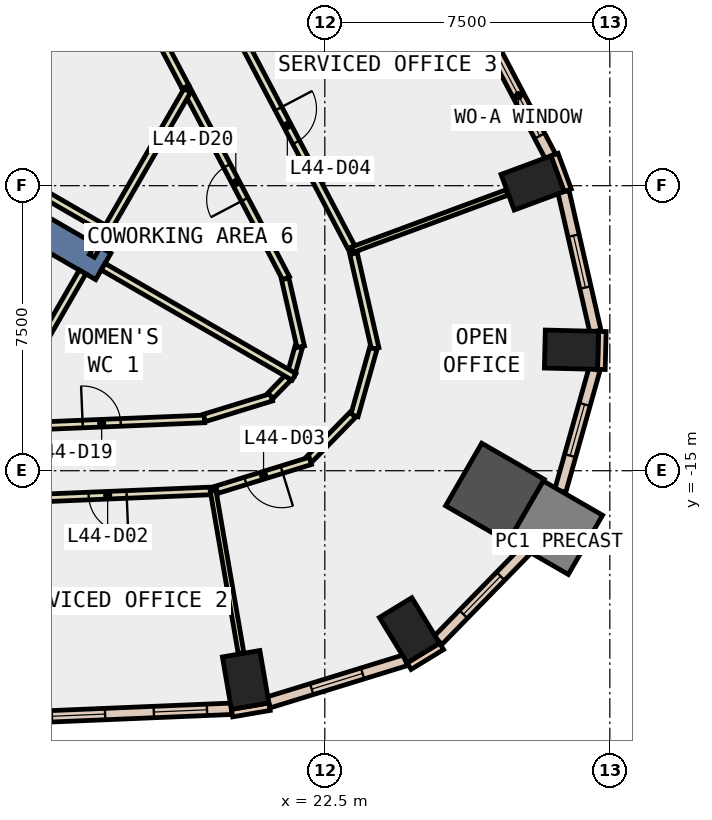
"""IFC4 building model, lengths in metres.
Left out: names, types, materials, properties, quantities, classifications, styles, units other than length and angle.
Written with IfcOpenShell. Run it as: python <this file> out.ifc"""

import sys

from ifc_helpers import new_model, si_unit, direction, frame, frame_2d, origin, origin_2d, place, context, subcontext, project, spatial, rectangle, extrude, element, fill, save


model = new_model("IFC4")
c1 = context("Model", 3, precision=1e-05, world=origin(), true_north=direction((0.0, 1.0)))
c2 = subcontext(c1, "Body", "Model", "MODEL_VIEW")
j1 = project(units=[si_unit("LENGTHUNIT", "METRE"), si_unit("PLANEANGLEUNIT", "RADIAN")], contexts=[c1])
p1 = place(None, origin())
s1 = spatial("IfcSite", under=j1, at=p1, CompositionType="ELEMENT")
p2 = place(p1, origin())
s2 = spatial("IfcBuilding", under=s1, at=p2, CompositionType="ELEMENT")
p3 = place(p2, frame((0.0, 0.0, 198.2)))
s3 = spatial("IfcBuildingStorey", under=s2, at=p3, CompositionType="ELEMENT", Elevation=198.2)
for number, where, z_axis, x_axis in (
    (1, (20.417, -20.505, -0.4), (0.0, 0.0, 1.0), (0.986, 0.169, 0.0)),
    (2, (24.728, -19.199, -0.4), (0.0, 0.0, 1.0), (0.853, 0.521, 0.0)),
):
    element("IfcColumn", number, at=place(p3, frame(where, z_axis=z_axis, x_axis=x_axis)), inside=s3, PredefinedType="COLUMN", context=c2, shape_type="SweptSolid", body=[
        extrude(rectangle(XDim=1.0, YDim=1.4, at=origin_2d()), origin(), (0.0, 0.0, 1.0), 4.2),
    ])
p4 = place(p3, frame((26.977, -15.575, -0.4), z_axis=(0.0, 0.0, 1.0), x_axis=(-0.866025403784, 0.5, 0.0)))
e3 = element("IfcColumn", 3, at=p4, inside=s3, PredefinedType="COLUMN", context=c2, shape_type="SweptSolid", body=[
    extrude(rectangle(XDim=1.9, YDim=1.9, at=origin_2d()), origin(), (0.0, 0.0, 1.0), 4.2),
])
for number, where, z_axis, x_axis in (
    (4, (28.99, -11.816, -0.4), (0.0, 0.0, 1.0), (0.025, 1.0, 0.0)),
    (5, (27.967, -7.429, -0.4), (0.0, 0.0, 1.0), (-0.347, 0.938, 0.0)),
):
    element("IfcColumn", number, at=place(p3, frame(where, z_axis=z_axis, x_axis=x_axis)), inside=s3, PredefinedType="COLUMN", context=c2, shape_type="SweptSolid", body=[
        extrude(rectangle(XDim=1.0, YDim=1.4, at=origin_2d()), origin(), (0.0, 0.0, 1.0), 4.2),
    ])
p5 = place(p3, frame((28.579, -16.5, -0.4), z_axis=(0.0, 0.0, 1.0), x_axis=(-0.866025403784, 0.5, 0.0)))
e6 = element("IfcColumn", 6, at=p5, inside=s3, PredefinedType="COLUMN", context=c2, shape_type="SweptSolid", body=[
    extrude(rectangle(XDim=1.8, YDim=1.8, at=origin_2d()), origin(), (0.0, 0.0, 1.0), 4.2),
])
p6 = place(p3, frame((8.877, -5.125, -0.4), z_axis=(0.0, 0.0, 1.0), x_axis=(0.866017533419, -0.500013631625, 0.0)))
e7 = element("IfcWall", 7, at=p6, inside=s3, PredefinedType="SHEAR", context=c2, shape_type="SweptSolid", body=[
    extrude(rectangle(XDim=9.0, YDim=0.8, at=frame_2d((4.5, 0.0))), origin(), (0.0, 0.0, 1.0), 4.2),
])
for number, where, z_axis, x_axis in (
    (8, (28.891, -7.621, 0.0), (0.0, 0.0, 1.0), (-0.347, 0.938, 0.0)),
    (9, (20.059, -21.378, 0.0), (0.0, 0.0, 1.0), (0.986, 0.169, 0.0)),
):
    element("IfcWall", number, at=place(p3, frame(where, z_axis=z_axis, x_axis=x_axis)), inside=s3, PredefinedType="STANDARD", context=c2, shape_type="SweptSolid", body=[
        extrude(rectangle(XDim=1.0, YDim=0.2, at=frame_2d((0.5, 0.0))), origin(), (0.0, 0.0, 1.0), 3.8),
    ])
p7 = place(p3, frame((24.718, -20.142, 0.0), z_axis=(0.0, 0.0, 1.0), x_axis=(0.853679739553, 0.520798331677, 0.0)))
e10 = element("IfcWall", 10, at=p7, inside=s3, PredefinedType="STANDARD", context=c2, shape_type="SweptSolid", body=[
    extrude(rectangle(XDim=1.0, YDim=0.2, at=frame_2d((0.5, 0.0))), origin(), (0.0, 0.0, 1.0), 3.8),
])
p8 = place(p3, frame((29.778, -12.335, 0.0), z_axis=(0.0, 0.0, 1.0), x_axis=(0.023942303888, 0.999713341956, 0.0)))
e11 = element("IfcWall", 11, at=p8, inside=s3, PredefinedType="STANDARD", context=c2, shape_type="SweptSolid", body=[
    extrude(rectangle(XDim=0.999, YDim=0.2, at=frame_2d((0.5, 0.0))), origin(), (0.0, 0.0, 1.0), 3.8),
])
p9 = place(p3, frame((14.678, -21.488, 0.0), z_axis=(0.0, 0.0, 1.0), x_axis=(0.999127941775, 0.041753514387, 0.0)))
e12 = element("IfcWall", 12, at=p9, inside=s3, PredefinedType="STANDARD", context=c2, shape_type="SweptSolid", body=[
    extrude(rectangle(XDim=5.368, YDim=0.3, at=frame_2d((2.684, 0.0))), origin(), (0.0, 0.0, 1.0), 3.8),
])
p10 = place(p9, frame((0.642, 0.0, 0.9)))
e13 = element("IfcOpeningElement", 13, at=p10, cuts=e12, PredefinedType="OPENING", context=c2, shape_type="SweptSolid", body=[
    extrude(rectangle(XDim=1.4, YDim=2.6, at=frame_2d((0.7, 1.3))), frame((0.0, 0.16, 0.0), z_axis=(0.0, -1.0, 0.0), x_axis=(1.0, 0.0, 0.0)), (0.0, 0.0, 1.0), 0.32),
])
p11 = place(p9, frame((3.326, 0.0, 0.9)))
e14 = element("IfcOpeningElement", 14, at=p11, cuts=e12, PredefinedType="OPENING", context=c2, shape_type="SweptSolid", body=[
    extrude(rectangle(XDim=1.4, YDim=2.6, at=frame_2d((0.7, 1.3))), frame((0.0, 0.16, 0.0), z_axis=(0.0, -1.0, 0.0), x_axis=(1.0, 0.0, 0.0)), (0.0, 0.0, 1.0), 0.32),
])
p12 = place(p3, frame((21.024, -21.095, 0.0), z_axis=(0.0, 0.0, 1.0), x_axis=(0.955692086233, 0.29436819854, 0.0)))
e15 = element("IfcWall", 15, at=p12, inside=s3, PredefinedType="STANDARD", context=c2, shape_type="SweptSolid", body=[
    extrude(rectangle(XDim=3.767, YDim=0.3, at=frame_2d((1.884, 0.0))), origin(), (0.0, 0.0, 1.0), 3.8),
])
p13 = place(p12, frame((1.183, 0.0, 0.9)))
e16 = element("IfcOpeningElement", 16, at=p13, cuts=e15, PredefinedType="OPENING", context=c2, shape_type="SweptSolid", body=[
    extrude(rectangle(XDim=1.4, YDim=2.6, at=frame_2d((0.7, 1.3))), frame((0.0, 0.16, 0.0), z_axis=(0.0, -1.0, 0.0), x_axis=(1.0, 0.0, 0.0)), (0.0, 0.0, 1.0), 0.32),
])
p14 = place(p3, frame((25.476, -19.466, 0.0), z_axis=(0.0, 0.0, 1.0), x_axis=(0.698311919602, 0.71579358962, 0.0)))
e17 = element("IfcWall", 17, at=p14, inside=s3, PredefinedType="STANDARD", context=c2, shape_type="SweptSolid", body=[
    extrude(rectangle(XDim=3.324, YDim=0.3, at=frame_2d((1.662, 0.0))), origin(), (0.0, 0.0, 1.0), 3.8),
])
p15 = place(p14, frame((0.962, 0.0, 0.9)))
e18 = element("IfcOpeningElement", 18, at=p15, cuts=e17, PredefinedType="OPENING", context=c2, shape_type="SweptSolid", body=[
    extrude(rectangle(XDim=1.4, YDim=2.6, at=frame_2d((0.7, 1.3))), frame((0.0, 0.16, 0.0), z_axis=(0.0, -1.0, 0.0), x_axis=(1.0, 0.0, 0.0)), (0.0, 0.0, 1.0), 0.32),
])
p16 = place(p3, frame((28.696, -15.529, 0.0), z_axis=(0.0, 0.0, 1.0), x_axis=(0.270798765166, 0.962635979374, 0.0)))
e19 = element("IfcWall", 19, at=p16, inside=s3, PredefinedType="STANDARD", context=c2, shape_type="SweptSolid", body=[
    extrude(rectangle(XDim=3.323, YDim=0.3, at=frame_2d((1.662, 0.0))), origin(), (0.0, 0.0, 1.0), 3.8),
])
p17 = place(p16, frame((0.962, 0.0, 0.9)))
e20 = element("IfcOpeningElement", 20, at=p17, cuts=e19, PredefinedType="OPENING", context=c2, shape_type="SweptSolid", body=[
    extrude(rectangle(XDim=1.4, YDim=2.6, at=frame_2d((0.7, 1.3))), frame((0.0, 0.16, 0.0), z_axis=(0.0, -1.0, 0.0), x_axis=(1.0, 0.0, 0.0)), (0.0, 0.0, 1.0), 0.32),
])
p18 = place(p3, frame((29.621, -11.332, 0.0), z_axis=(0.0, 0.0, 1.0), x_axis=(-0.223013094864, 0.974815448954, 0.0)))
e21 = element("IfcWall", 21, at=p18, inside=s3, PredefinedType="STANDARD", context=c2, shape_type="SweptSolid", body=[
    extrude(rectangle(XDim=3.767, YDim=0.3, at=frame_2d((1.884, 0.0))), origin(), (0.0, 0.0, 1.0), 3.8),
])
p19 = place(p18, frame((1.183, 0.0, 0.9)))
e22 = element("IfcOpeningElement", 22, at=p19, cuts=e21, PredefinedType="OPENING", context=c2, shape_type="SweptSolid", body=[
    extrude(rectangle(XDim=1.4, YDim=2.6, at=frame_2d((0.7, 1.3))), frame((0.0, 0.16, 0.0), z_axis=(0.0, -1.0, 0.0), x_axis=(1.0, 0.0, 0.0)), (0.0, 0.0, 1.0), 0.32),
])
p20 = place(p3, frame((28.435, -6.724, 0.0), z_axis=(0.0, 0.0, 1.0), x_axis=(-0.465478369088, 0.885059256723, 0.0)))
e23 = element("IfcWall", 23, at=p20, inside=s3, PredefinedType="STANDARD", context=c2, shape_type="SweptSolid", body=[
    extrude(rectangle(XDim=7.208, YDim=0.3, at=frame_2d((3.604, 0.0))), origin(), (0.0, 0.0, 1.0), 3.8),
])
p21 = place(p20, frame((0.602, 0.0, 0.9)))
e24 = element("IfcOpeningElement", 24, at=p21, cuts=e23, PredefinedType="OPENING", context=c2, shape_type="SweptSolid", body=[
    extrude(rectangle(XDim=2.4, YDim=2.6, at=frame_2d((1.2, 1.3))), frame((0.0, 0.16, 0.0), z_axis=(0.0, -1.0, 0.0), x_axis=(1.0, 0.0, 0.0)), (0.0, 0.0, 1.0), 0.32),
])
p22 = place(p20, frame((4.206, 0.0, 0.9)))
e25 = element("IfcOpeningElement", 25, at=p22, cuts=e23, PredefinedType="OPENING", context=c2, shape_type="SweptSolid", body=[
    extrude(rectangle(XDim=2.4, YDim=2.6, at=frame_2d((1.2, 1.3))), frame((0.0, 0.16, 0.0), z_axis=(0.0, -1.0, 0.0), x_axis=(1.0, 0.0, 0.0)), (0.0, 0.0, 1.0), 0.32),
])
p23 = place(p3, frame((18.836, -4.906, 0.0), z_axis=(0.0, 0.0, 1.0), x_axis=(-0.465843561357, 0.884867095299, 0.0)))
e26 = element("IfcWall", 26, at=p23, inside=s3, PredefinedType="PARTITIONING", context=c2, shape_type="SweptSolid", body=[
    extrude(rectangle(XDim=1.554, YDim=0.2, at=frame_2d((0.777, 0.0))), origin(), (0.0, 0.0, 1.0), 3.8),
])
p24 = place(p3, frame((13.919, -13.863, 0.0), z_axis=(0.0, 0.0, 1.0), x_axis=(0.999130261307, 0.041697972867, 0.0)))
e27 = element("IfcWall", 27, at=p24, inside=s3, PredefinedType="PARTITIONING", context=c2, shape_type="SweptSolid", body=[
    extrude(rectangle(XDim=5.422, YDim=0.2, at=frame_2d((2.711, 0.0))), origin(), (0.0, 0.0, 1.0), 3.8),
])
p25 = place(p24, frame((2.211, 0.0, 0.0)))
e28 = element("IfcOpeningElement", 28, at=p25, cuts=e27, PredefinedType="OPENING", context=c2, shape_type="SweptSolid", body=[
    extrude(rectangle(XDim=1.0, YDim=2.1, at=frame_2d((0.5, 1.05))), frame((0.0, 0.11, 0.0), z_axis=(0.0, -1.0, 0.0), x_axis=(1.0, 0.0, 0.0)), (0.0, 0.0, 1.0), 0.22),
])
p26 = place(p3, frame((19.332, -13.611, 0.0), z_axis=(0.0, 0.0, 1.0), x_axis=(0.955790442908, 0.294048685161, 0.0)))
e29 = element("IfcWall", 29, at=p26, inside=s3, PredefinedType="PARTITIONING", context=c2, shape_type="SweptSolid", body=[
    extrude(rectangle(XDim=1.846, YDim=0.2, at=frame_2d((0.923, 0.0))), origin(), (0.0, 0.0, 1.0), 3.8),
])
p27 = place(p3, frame((21.072, -13.026, 0.0), z_axis=(0.0, 0.0, 1.0), x_axis=(0.697252405765, 0.716825698936, 0.0)))
e30 = element("IfcWall", 30, at=p27, inside=s3, PredefinedType="PARTITIONING", context=c2, shape_type="SweptSolid", body=[
    extrude(rectangle(XDim=0.661, YDim=0.2, at=frame_2d((0.331, 0.0))), origin(), (0.0, 0.0, 1.0), 3.8),
])
p28 = place(p3, frame((21.608, -12.476, 0.0), z_axis=(0.0, 0.0, 1.0), x_axis=(0.270277025631, 0.962782597171, 0.0)))
e31 = element("IfcWall", 31, at=p28, inside=s3, PredefinedType="PARTITIONING", context=c2, shape_type="SweptSolid", body=[
    extrude(rectangle(XDim=0.77, YDim=0.2, at=frame_2d((0.385, 0.0))), origin(), (0.0, 0.0, 1.0), 3.8),
])
p29 = place(p3, frame((21.866, -11.737, 0.0), z_axis=(0.0, 0.0, 1.0), x_axis=(-0.222871656966, 0.974847795567, 0.0)))
e32 = element("IfcWall", 32, at=p29, inside=s3, PredefinedType="PARTITIONING", context=c2, shape_type="SweptSolid", body=[
    extrude(rectangle(XDim=1.839, YDim=0.2, at=frame_2d((0.919, 0.0))), origin(), (0.0, 0.0, 1.0), 3.8),
])
p30 = place(p3, frame((21.48, -9.935, 0.0), z_axis=(0.0, 0.0, 1.0), x_axis=(-0.465356775138, 0.885123195851, 0.0)))
e33 = element("IfcWall", 33, at=p30, inside=s3, PredefinedType="PARTITIONING", context=c2, shape_type="SweptSolid", body=[
    extrude(rectangle(XDim=5.682, YDim=0.2, at=frame_2d((2.841, 0.0))), origin(), (0.0, 0.0, 1.0), 3.8),
])
p31 = place(p30, frame((2.341, 0.0, 0.0)))
e34 = element("IfcOpeningElement", 34, at=p31, cuts=e33, PredefinedType="OPENING", context=c2, shape_type="SweptSolid", body=[
    extrude(rectangle(XDim=1.0, YDim=2.1, at=frame_2d((0.5, 1.05))), frame((0.0, 0.11, 0.0), z_axis=(0.0, -1.0, 0.0), x_axis=(1.0, 0.0, 0.0)), (0.0, 0.0, 1.0), 0.22),
])
p32 = place(p3, frame((19.661, -15.525, 0.0), z_axis=(0.0, 0.0, 1.0), x_axis=(-0.999127706659, -0.041759140148, 0.0)))
e35 = element("IfcWall", 35, at=p32, inside=s3, PredefinedType="PARTITIONING", context=c2, shape_type="SweptSolid", body=[
    extrude(rectangle(XDim=5.607, YDim=0.2, at=frame_2d((2.803, 0.0))), origin(), (0.0, 0.0, 1.0), 3.8),
])
p33 = place(p32, frame((2.378, 0.0, 0.0)))
e36 = element("IfcOpeningElement", 36, at=p33, cuts=e35, PredefinedType="OPENING", context=c2, shape_type="SweptSolid", body=[
    extrude(rectangle(XDim=1.0, YDim=2.1, at=frame_2d((0.5, 1.05))), frame((0.0, 0.11, 0.0), z_axis=(0.0, -1.0, 0.0), x_axis=(1.0, 0.0, 0.0)), (0.0, 0.0, 1.0), 0.22),
])
p34 = place(p3, frame((23.253, -9.279, 0.0), z_axis=(0.0, 0.0, 1.0), x_axis=(0.222909903746, -0.974839050722, 0.0)))
e37 = element("IfcWall", 37, at=p34, inside=s3, PredefinedType="PARTITIONING", context=c2, shape_type="SweptSolid", body=[
    extrude(rectangle(XDim=2.571, YDim=0.2, at=frame_2d((1.285, 0.0))), origin(), (0.0, 0.0, 1.0), 3.8),
])
p35 = place(p3, frame((23.776, -11.784, 0.0), z_axis=(0.0, 0.0, 1.0), x_axis=(-0.270522287318, -0.962713712411, 0.0)))
e38 = element("IfcWall", 38, at=p35, inside=s3, PredefinedType="PARTITIONING", context=c2, shape_type="SweptSolid", body=[
    extrude(rectangle(XDim=1.836, YDim=0.2, at=frame_2d((0.918, 0.0))), origin(), (0.0, 0.0, 1.0), 3.8),
])
p36 = place(p3, frame((23.236, -13.528, 0.0), z_axis=(0.0, 0.0, 1.0), x_axis=(-0.698551276451, -0.715560000397, 0.0)))
e39 = element("IfcWall", 39, at=p36, inside=s3, PredefinedType="PARTITIONING", context=c2, shape_type="SweptSolid", body=[
    extrude(rectangle(XDim=1.636, YDim=0.2, at=frame_2d((0.818, 0.0))), origin(), (0.0, 0.0, 1.0), 3.8),
])
p37 = place(p3, frame((22.119, -14.741, 0.0), z_axis=(0.0, 0.0, 1.0), x_axis=(-0.955612889251, -0.294625195625, 0.0)))
e40 = element("IfcWall", 40, at=p37, inside=s3, PredefinedType="PARTITIONING", context=c2, shape_type="SweptSolid", body=[
    extrude(rectangle(XDim=2.576, YDim=0.2, at=frame_2d((1.288, 0.0))), origin(), (0.0, 0.0, 1.0), 3.8),
])
p38 = place(p37, frame((0.788, 0.0, 0.0)))
e41 = element("IfcOpeningElement", 41, at=p38, cuts=e40, PredefinedType="OPENING", context=c2, shape_type="SweptSolid", body=[
    extrude(rectangle(XDim=1.0, YDim=2.1, at=frame_2d((0.5, 1.05))), frame((0.0, 0.11, 0.0), z_axis=(0.0, -1.0, 0.0), x_axis=(1.0, 0.0, 0.0)), (0.0, 0.0, 1.0), 0.22),
])
p39 = place(p3, frame((19.75, -2.563, 0.0), z_axis=(0.0, 0.0, 1.0), x_axis=(0.465444987791, -0.885076812113, 0.0)))
e42 = element("IfcWall", 42, at=p39, inside=s3, PredefinedType="PARTITIONING", context=c2, shape_type="SweptSolid", body=[
    extrude(rectangle(XDim=7.578, YDim=0.2, at=frame_2d((3.789, 0.0))), origin(), (0.0, 0.0, 1.0), 3.8),
])
p40 = place(p39, frame((3.289, 0.0, 0.0)))
e43 = element("IfcOpeningElement", 43, at=p40, cuts=e42, PredefinedType="OPENING", context=c2, shape_type="SweptSolid", body=[
    extrude(rectangle(XDim=1.0, YDim=2.1, at=frame_2d((0.5, 1.05))), frame((0.0, 0.11, 0.0), z_axis=(0.0, -1.0, 0.0), x_axis=(1.0, 0.0, 0.0)), (0.0, 0.0, 1.0), 0.22),
])
p41 = place(p3, frame((9.853, -4.684, 0.0), z_axis=(0.0, 0.0, 1.0), x_axis=(0.865999791918, -0.500044358431, 0.0)))
e44 = element("IfcWall", 44, at=p41, inside=s3, PredefinedType="PARTITIONING", context=c2, shape_type="SweptSolid", body=[
    extrude(rectangle(XDim=8.075, YDim=0.2, at=frame_2d((4.038, 0.0))), origin(), (0.0, 0.0, 1.0), 3.8),
])
p42 = place(p3, frame((16.125, -9.771, 0.0), z_axis=(0.0, 0.0, 1.0), x_axis=(-0.500030759312, -0.866007644159, 0.0)))
e45 = element("IfcWall", 45, at=p42, inside=s3, PredefinedType="PARTITIONING", context=c2, shape_type="SweptSolid", body=[
    extrude(rectangle(XDim=4.73, YDim=0.2, at=frame_2d((2.365, 0.0))), origin(), (0.0, 0.0, 1.0), 3.8),
])
p43 = place(p3, frame((16.71, -8.758, 0.0), z_axis=(0.0, 0.0, 1.0), x_axis=(-0.500013496215, -0.866017611601, 0.0)))
e46 = element("IfcWall", 46, at=p43, inside=s3, PredefinedType="PARTITIONING", context=c2, shape_type="SweptSolid", body=[
    extrude(rectangle(XDim=0.678, YDim=0.15, at=frame_2d((0.339, 0.0))), origin(), (0.0, 0.0, 1.0), 3.8),
])
p44 = place(p3, frame((18.882, -4.995, 0.0), z_axis=(0.0, 0.0, 1.0), x_axis=(-0.499895813511, -0.866085547527, 0.0)))
e47 = element("IfcWall", 47, at=p44, inside=s3, PredefinedType="PARTITIONING", context=c2, shape_type="SweptSolid", body=[
    extrude(rectangle(XDim=4.145, YDim=0.2, at=frame_2d((2.073, 0.0))), origin(), (0.0, 0.0, 1.0), 3.8),
])
p45 = place(p3, frame((16.667, -9.631, 0.0), z_axis=(0.0, 0.0, 1.0), x_axis=(0.866032775405, -0.499987231761, 0.0)))
e48 = element("IfcWall", 48, at=p45, inside=s3, PredefinedType="PARTITIONING", context=c2, shape_type="SweptSolid", body=[
    extrude(rectangle(XDim=5.8, YDim=0.2, at=frame_2d((2.9, 0.0))), origin(), (0.0, 0.0, 1.0), 3.8),
])
p46 = place(p3, frame((19.561, -15.529, 0.0), z_axis=(0.0, 0.0, 1.0), x_axis=(0.169546150064, -0.98552224886, 0.0)))
e49 = element("IfcWall", 49, at=p46, inside=s3, PredefinedType="PARTITIONING", context=c2, shape_type="SweptSolid", body=[
    extrude(rectangle(XDim=4.329, YDim=0.15, at=frame_2d((2.164, 0.0))), origin(), (0.0, 0.0, 1.0), 3.8),
])
p47 = place(p3, frame((23.231, -9.182, 0.0), z_axis=(0.0, 0.0, 1.0), x_axis=(0.937835784628, 0.34707930084, 0.0)))
e50 = element("IfcWall", 50, at=p47, inside=s3, PredefinedType="PARTITIONING", context=c2, shape_type="SweptSolid", body=[
    extrude(rectangle(XDim=4.33, YDim=0.15, at=frame_2d((2.165, 0.0))), origin(), (0.0, 0.0, 1.0), 3.8),
])
p48 = place(p10, origin())
e51 = element("IfcWindow", 51, at=p48, inside=s3, PartitioningType="SINGLE_PANEL", PredefinedType="WINDOW", context=c2, shape_type="SweptSolid", body=[
    extrude(rectangle(XDim=1.4, YDim=2.6, at=frame_2d((0.7, 1.3))), frame((0.0, 0.03, 0.0), z_axis=(0.0, -1.0, 0.0), x_axis=(1.0, 0.0, 0.0)), (0.0, 0.0, 1.0), 0.06),
])
fill(e13, e51)
p49 = place(p11, origin())
e52 = element("IfcWindow", 52, at=p49, inside=s3, PartitioningType="SINGLE_PANEL", PredefinedType="WINDOW", context=c2, shape_type="SweptSolid", body=[
    extrude(rectangle(XDim=1.4, YDim=2.6, at=frame_2d((0.7, 1.3))), frame((0.0, 0.03, 0.0), z_axis=(0.0, -1.0, 0.0), x_axis=(1.0, 0.0, 0.0)), (0.0, 0.0, 1.0), 0.06),
])
fill(e14, e52)
p50 = place(p13, origin())
e53 = element("IfcWindow", 53, at=p50, inside=s3, PartitioningType="SINGLE_PANEL", PredefinedType="WINDOW", context=c2, shape_type="SweptSolid", body=[
    extrude(rectangle(XDim=1.4, YDim=2.6, at=frame_2d((0.7, 1.3))), frame((0.0, 0.03, 0.0), z_axis=(0.0, -1.0, 0.0), x_axis=(1.0, 0.0, 0.0)), (0.0, 0.0, 1.0), 0.06),
])
fill(e16, e53)
p51 = place(p15, origin())
e54 = element("IfcWindow", 54, at=p51, inside=s3, PartitioningType="SINGLE_PANEL", PredefinedType="WINDOW", context=c2, shape_type="SweptSolid", body=[
    extrude(rectangle(XDim=1.4, YDim=2.6, at=frame_2d((0.7, 1.3))), frame((0.0, 0.03, 0.0), z_axis=(0.0, -1.0, 0.0), x_axis=(1.0, 0.0, 0.0)), (0.0, 0.0, 1.0), 0.06),
])
fill(e18, e54)
p52 = place(p17, origin())
e55 = element("IfcWindow", 55, at=p52, inside=s3, PartitioningType="SINGLE_PANEL", PredefinedType="WINDOW", context=c2, shape_type="SweptSolid", body=[
    extrude(rectangle(XDim=1.4, YDim=2.6, at=frame_2d((0.7, 1.3))), frame((0.0, 0.03, 0.0), z_axis=(0.0, -1.0, 0.0), x_axis=(1.0, 0.0, 0.0)), (0.0, 0.0, 1.0), 0.06),
])
fill(e20, e55)
p53 = place(p19, origin())
e56 = element("IfcWindow", 56, at=p53, inside=s3, PartitioningType="SINGLE_PANEL", PredefinedType="WINDOW", context=c2, shape_type="SweptSolid", body=[
    extrude(rectangle(XDim=1.4, YDim=2.6, at=frame_2d((0.7, 1.3))), frame((0.0, 0.03, 0.0), z_axis=(0.0, -1.0, 0.0), x_axis=(1.0, 0.0, 0.0)), (0.0, 0.0, 1.0), 0.06),
])
fill(e22, e56)
p54 = place(p21, origin())
e57 = element("IfcWindow", 57, at=p54, inside=s3, PartitioningType="SINGLE_PANEL", PredefinedType="WINDOW", context=c2, shape_type="SweptSolid", body=[
    extrude(rectangle(XDim=2.4, YDim=2.6, at=frame_2d((1.2, 1.3))), frame((0.0, 0.03, 0.0), z_axis=(0.0, -1.0, 0.0), x_axis=(1.0, 0.0, 0.0)), (0.0, 0.0, 1.0), 0.06),
])
fill(e24, e57)
p55 = place(p33, origin())
e58 = element("IfcDoor", 58, at=p55, inside=s3, OperationType="SINGLE_SWING_LEFT", PredefinedType="DOOR", context=c2, shape_type="SweptSolid", body=[
    extrude(rectangle(XDim=1.0, YDim=2.1, at=frame_2d((0.5, 1.05))), frame((0.0, 0.025, 0.0), z_axis=(0.0, -1.0, 0.0), x_axis=(1.0, 0.0, 0.0)), (0.0, 0.0, 1.0), 0.05),
])
fill(e36, e58)
p56 = place(p38, origin())
e59 = element("IfcDoor", 59, at=p56, inside=s3, OperationType="SINGLE_SWING_LEFT", PredefinedType="DOOR", context=c2, shape_type="SweptSolid", body=[
    extrude(rectangle(XDim=1.0, YDim=2.1, at=frame_2d((0.5, 1.05))), frame((0.0, 0.025, 0.0), z_axis=(0.0, -1.0, 0.0), x_axis=(1.0, 0.0, 0.0)), (0.0, 0.0, 1.0), 0.05),
])
fill(e41, e59)
p57 = place(p40, origin())
e60 = element("IfcDoor", 60, at=p57, inside=s3, OperationType="SINGLE_SWING_LEFT", PredefinedType="DOOR", context=c2, shape_type="SweptSolid", body=[
    extrude(rectangle(XDim=1.0, YDim=2.1, at=frame_2d((0.5, 1.05))), frame((0.0, 0.025, 0.0), z_axis=(0.0, -1.0, 0.0), x_axis=(1.0, 0.0, 0.0)), (0.0, 0.0, 1.0), 0.05),
])
fill(e43, e60)
p58 = place(p25, origin())
e61 = element("IfcDoor", 61, at=p58, inside=s3, OperationType="SINGLE_SWING_LEFT", PredefinedType="DOOR", context=c2, shape_type="SweptSolid", body=[
    extrude(rectangle(XDim=1.0, YDim=2.1, at=frame_2d((0.5, 1.05))), frame((0.0, 0.025, 0.0), z_axis=(0.0, -1.0, 0.0), x_axis=(1.0, 0.0, 0.0)), (0.0, 0.0, 1.0), 0.05),
])
fill(e28, e61)
p59 = place(p31, origin())
e62 = element("IfcDoor", 62, at=p59, inside=s3, OperationType="SINGLE_SWING_LEFT", PredefinedType="DOOR", context=c2, shape_type="SweptSolid", body=[
    extrude(rectangle(XDim=1.0, YDim=2.1, at=frame_2d((0.5, 1.05))), frame((0.0, 0.025, 0.0), z_axis=(0.0, -1.0, 0.0), x_axis=(1.0, 0.0, 0.0)), (0.0, 0.0, 1.0), 0.05),
])
fill(e34, e62)
save(model, sys.argv[1])
